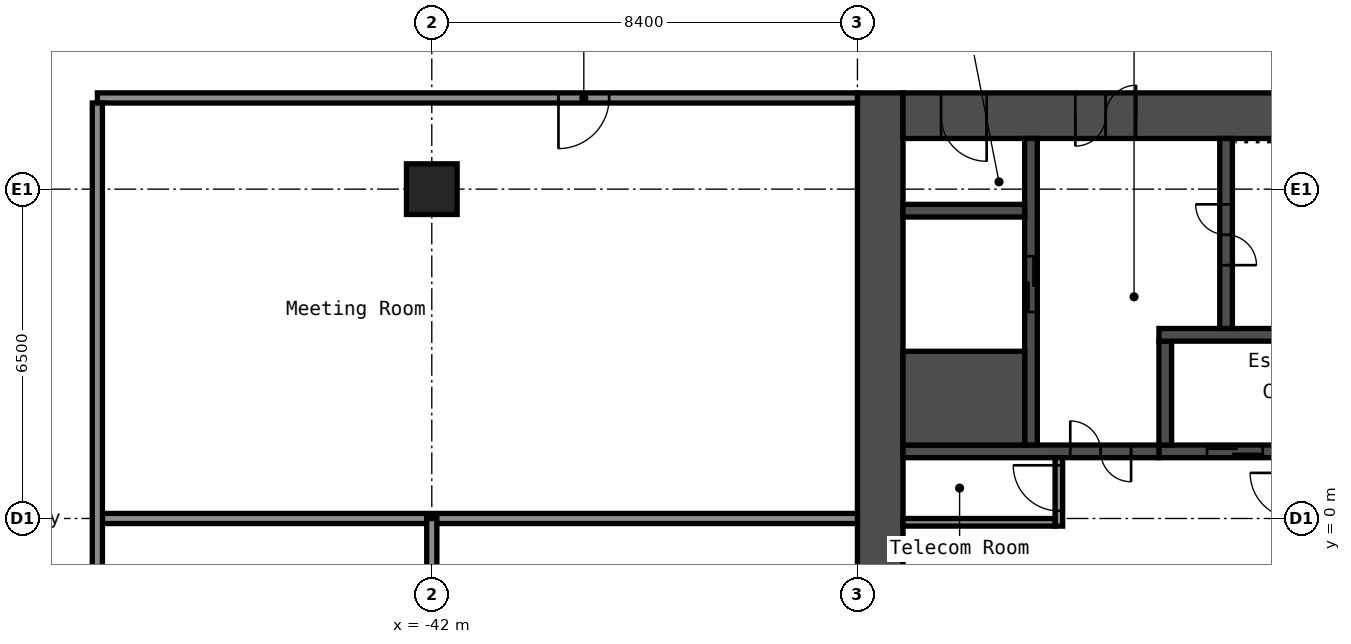
"""IFC4 building model, lengths in metres.
Left out: names, types, materials, properties, quantities, classifications, styles, units other than length and angle.
Written with IfcOpenShell. Run it as: python <this file> out.ifc"""

import sys

from ifc_helpers import new_model, si_unit, direction, frame, frame_2d, origin, origin_2d, place, context, subcontext, project, spatial, rectangle, hollow_rectangle, extrude, element, fill, save


model = new_model("IFC4")
c1 = context("Model", 3, precision=1e-05, world=origin(), true_north=direction((0.0, 1.0)))
c2 = subcontext(c1, "Body", "Model", "MODEL_VIEW")
j1 = project(units=[si_unit("LENGTHUNIT", "METRE"), si_unit("PLANEANGLEUNIT", "RADIAN")], contexts=[c1])
p1 = place(None, origin())
s1 = spatial("IfcSite", under=j1, at=p1, CompositionType="ELEMENT")
p2 = place(p1, origin())
s2 = spatial("IfcBuilding", under=s1, at=p2, CompositionType="ELEMENT")
p3 = place(p2, frame((0.0, 0.0, 39.0)))
s3 = spatial("IfcBuildingStorey", under=s2, at=p3, CompositionType="ELEMENT", Elevation=39.0)
p4 = place(p3, frame((-42.0, 6.5, 0.0), z_axis=(0.0, 0.0, 1.0), x_axis=(1.0, 0.0, 0.0)))
e1 = element("IfcColumn", 1, at=p4, inside=s3, PredefinedType="COLUMN", context=c2, shape_type="SweptSolid", body=[
    extrude(hollow_rectangle(XDim=1.0, YDim=1.0, WallThickness=0.04, at=origin_2d()), origin(), (0.0, 0.0, 1.0), 2.8),
])
p5 = place(p3, frame((-33.15, -8.4, 0.0), z_axis=(0.0, 0.0, 1.0), x_axis=(0.0, 1.0, 0.0)))
e2 = element("IfcWall", 2, at=p5, inside=s3, PredefinedType="SHEAR", context=c2, shape_type="SweptSolid", body=[
    extrude(rectangle(XDim=16.8, YDim=0.9, at=frame_2d((8.4, 0.0))), origin(), (0.0, 0.0, 1.0), 2.8),
])
p6 = place(p3, frame((-32.7, 7.95, 0.0), z_axis=(0.0, 0.0, 1.0), x_axis=(1.0, 0.0, 0.0)))
e3 = element("IfcWall", 3, at=p6, inside=s3, PredefinedType="SHEAR", context=c2, shape_type="SweptSolid", body=[
    extrude(rectangle(XDim=15.0, YDim=0.9, at=frame_2d((7.5, 0.0))), origin(), (0.0, 0.0, 1.0), 2.8),
])
p7 = place(p6, frame((3.4, 0.0, 0.0)))
e4 = element("IfcOpeningElement", 4, at=p7, cuts=e3, PredefinedType="OPENING", context=c2, shape_type="SweptSolid", body=[
    extrude(rectangle(XDim=1.2, YDim=2.1, at=frame_2d((0.6, 1.05))), frame((0.0, 0.46, 0.0), z_axis=(0.0, -1.0, 0.0), x_axis=(1.0, 0.0, 0.0)), (0.0, 0.0, 1.0), 0.92),
])
p8 = place(p6, frame((0.75, 0.0, 0.0)))
e5 = element("IfcOpeningElement", 5, at=p8, cuts=e3, PredefinedType="OPENING", context=c2, shape_type="SweptSolid", body=[
    extrude(rectangle(XDim=0.9, YDim=2.1, at=frame_2d((0.45, 1.05))), frame((0.0, 0.46, 0.0), z_axis=(0.0, -1.0, 0.0), x_axis=(1.0, 0.0, 0.0)), (0.0, 0.0, 1.0), 0.92),
])
p9 = place(p3, frame((-27.65, 1.325, 0.0), z_axis=(0.0, 0.0, 1.0), x_axis=(1.0, 0.0, 0.0)))
e6 = element("IfcWall", 6, at=p9, inside=s3, PredefinedType="SHEAR", context=c2, shape_type="SweptSolid", body=[
    extrude(rectangle(XDim=7.5, YDim=0.25, at=frame_2d((3.75, 0.0))), origin(), (0.0, 0.0, 1.0), 2.8),
])
p10 = place(p9, frame((5.75, 0.0, 0.0)))
e7 = element("IfcOpeningElement", 7, at=p10, cuts=e6, PredefinedType="OPENING", context=c2, shape_type="SweptSolid", body=[
    extrude(rectangle(XDim=1.1, YDim=2.1, at=frame_2d((0.55, 1.05))), frame((0.0, 0.135, 0.0), z_axis=(0.0, -1.0, 0.0), x_axis=(1.0, 0.0, 0.0)), (0.0, 0.0, 1.0), 0.27),
])
p11 = place(p9, frame((3.35, 0.0, 0.0)))
e8 = element("IfcOpeningElement", 8, at=p11, cuts=e6, PredefinedType="OPENING", context=c2, shape_type="SweptSolid", body=[
    extrude(rectangle(XDim=1.1, YDim=2.1, at=frame_2d((0.55, 1.05))), frame((0.0, 0.135, 0.0), z_axis=(0.0, -1.0, 0.0), x_axis=(1.0, 0.0, 0.0)), (0.0, 0.0, 1.0), 0.27),
])
p12 = place(p9, frame((0.95, 0.0, 0.0)))
e9 = element("IfcOpeningElement", 9, at=p12, cuts=e6, PredefinedType="OPENING", context=c2, shape_type="SweptSolid", body=[
    extrude(rectangle(XDim=1.1, YDim=2.1, at=frame_2d((0.55, 1.05))), frame((0.0, 0.135, 0.0), z_axis=(0.0, -1.0, 0.0), x_axis=(1.0, 0.0, 0.0)), (0.0, 0.0, 1.0), 0.27),
])
p13 = place(p3, frame((-27.525, 1.45, 0.0), z_axis=(0.0, 0.0, 1.0), x_axis=(0.0, 1.0, 0.0)))
e10 = element("IfcWall", 10, at=p13, inside=s3, PredefinedType="SHEAR", context=c2, shape_type="SweptSolid", body=[
    extrude(rectangle(XDim=2.05, YDim=0.25, at=frame_2d((1.025, 0.0))), origin(), (0.0, 0.0, 1.0), 2.8),
])
p14 = place(p3, frame((-27.65, 3.625, 0.0), z_axis=(0.0, 0.0, 1.0), x_axis=(1.0, 0.0, 0.0)))
e11 = element("IfcWall", 11, at=p14, inside=s3, PredefinedType="SHEAR", context=c2, shape_type="SweptSolid", body=[
    extrude(rectangle(XDim=7.5, YDim=0.25, at=frame_2d((3.75, 0.0))), origin(), (0.0, 0.0, 1.0), 2.8),
])
p15 = place(p3, frame((-26.325, 3.75, 0.0), z_axis=(0.0, 0.0, 1.0), x_axis=(0.0, 1.0, 0.0)))
e12 = element("IfcWall", 12, at=p15, inside=s3, PredefinedType="SHEAR", context=c2, shape_type="SweptSolid", body=[
    extrude(rectangle(XDim=3.75, YDim=0.25, at=frame_2d((1.875, 0.0))), origin(), (0.0, 0.0, 1.0), 2.8),
])
p16 = place(p15, frame((1.25, 0.0, 0.0)))
e13 = element("IfcOpeningElement", 13, at=p16, cuts=e12, PredefinedType="OPENING", context=c2, shape_type="SweptSolid", body=[
    extrude(rectangle(XDim=1.2, YDim=2.1, at=frame_2d((0.6, 1.05))), frame((0.0, 0.135, 0.0), z_axis=(0.0, -1.0, 0.0), x_axis=(1.0, 0.0, 0.0)), (0.0, 0.0, 1.0), 0.27),
])
p17 = place(p3, frame((-32.7, 1.325, 0.0), z_axis=(0.0, 0.0, 1.0), x_axis=(1.0, 0.0, 0.0)))
e14 = element("IfcWall", 14, at=p17, inside=s3, PredefinedType="SHEAR", context=c2, shape_type="SweptSolid", body=[
    extrude(rectangle(XDim=5.05, YDim=0.25, at=frame_2d((2.525, 0.0))), origin(), (0.0, 0.0, 1.0), 2.8),
])
p18 = place(p17, frame((3.3, 0.0, 0.0)))
e15 = element("IfcOpeningElement", 15, at=p18, cuts=e14, PredefinedType="OPENING", context=c2, shape_type="SweptSolid", body=[
    extrude(rectangle(XDim=1.2, YDim=2.1, at=frame_2d((0.6, 1.05))), frame((0.0, 0.135, 0.0), z_axis=(0.0, -1.0, 0.0), x_axis=(1.0, 0.0, 0.0)), (0.0, 0.0, 1.0), 0.27),
])
p19 = place(p3, frame((-30.175, 1.45, 0.0), z_axis=(0.0, 0.0, 1.0), x_axis=(0.0, 1.0, 0.0)))
e16 = element("IfcWall", 16, at=p19, inside=s3, PredefinedType="SHEAR", context=c2, shape_type="SweptSolid", body=[
    extrude(rectangle(XDim=6.05, YDim=0.25, at=frame_2d((3.025, 0.0))), origin(), (0.0, 0.0, 1.0), 2.8),
])
p20 = place(p19, frame((2.625, 0.0, 0.0)))
e17 = element("IfcOpeningElement", 17, at=p20, cuts=e16, PredefinedType="OPENING", context=c2, shape_type="SweptSolid", body=[
    extrude(rectangle(XDim=1.1, YDim=2.1, at=frame_2d((0.55, 1.05))), frame((0.0, 0.135, 0.0), z_axis=(0.0, -1.0, 0.0), x_axis=(1.0, 0.0, 0.0)), (0.0, 0.0, 1.0), 0.27),
])
p21 = place(p3, frame((-32.7, 2.375, 0.0), z_axis=(0.0, 0.0, 1.0), x_axis=(1.0, 0.0, 0.0)))
e18 = element("IfcWall", 18, at=p21, inside=s3, PredefinedType="SHEAR", context=c2, shape_type="SweptSolid", body=[
    extrude(rectangle(XDim=2.4, YDim=1.85, at=frame_2d((1.2, 0.0))), origin(), (0.0, 0.0, 1.0), 2.8),
])
p22 = place(p3, frame((-32.7, 6.075, 0.0), z_axis=(0.0, 0.0, 1.0), x_axis=(1.0, 0.0, 0.0)))
e19 = element("IfcWall", 19, at=p22, inside=s3, PredefinedType="SHEAR", context=c2, shape_type="SweptSolid", body=[
    extrude(rectangle(XDim=2.4, YDim=0.25, at=frame_2d((1.2, 0.0))), origin(), (0.0, 0.0, 1.0), 2.8),
])
p23 = place(p3, frame((-29.625, -0.15, 0.0), z_axis=(0.0, 0.0, 1.0), x_axis=(0.0, 1.0, 0.0)))
e20 = element("IfcWall", 20, at=p23, inside=s3, PredefinedType="PARTITIONING", context=c2, shape_type="SweptSolid", body=[
    extrude(rectangle(XDim=1.35, YDim=0.15, at=frame_2d((0.675, 0.0))), origin(), (0.0, 0.0, 1.0), 2.8),
])
p24 = place(p23, frame((0.3, 0.0, 0.0)))
e21 = element("IfcOpeningElement", 21, at=p24, cuts=e20, PredefinedType="OPENING", context=c2, shape_type="SweptSolid", body=[
    extrude(rectangle(XDim=0.9, YDim=2.1, at=frame_2d((0.45, 1.05))), frame((0.0, 0.085, 0.0), z_axis=(0.0, -1.0, 0.0), x_axis=(1.0, 0.0, 0.0)), (0.0, 0.0, 1.0), 0.17),
])
p25 = place(p3, frame((-32.7, -0.075, 0.0), z_axis=(0.0, 0.0, 1.0), x_axis=(1.0, 0.0, 0.0)))
e22 = element("IfcWall", 22, at=p25, inside=s3, PredefinedType="PARTITIONING", context=c2, shape_type="SweptSolid", body=[
    extrude(rectangle(XDim=3.0, YDim=0.15, at=frame_2d((1.5, 0.0))), origin(), (0.0, 0.0, 1.0), 2.8),
])
p26 = place(p3, frame((-48.5, 0.0, 0.0), z_axis=(0.0, 0.0, 1.0), x_axis=(1.0, 0.0, 0.0)))
e23 = element("IfcWall", 23, at=p26, inside=s3, PredefinedType="PARTITIONING", context=c2, shape_type="SweptSolid", body=[
    extrude(rectangle(XDim=14.9, YDim=0.2, at=frame_2d((7.45, 0.0))), origin(), (0.0, 0.0, 1.0), 2.8),
])
p27 = place(p3, frame((-48.6, 8.3, 0.0), z_axis=(0.0, 0.0, 1.0), x_axis=(1.0, 0.0, 0.0)))
e24 = element("IfcWall", 24, at=p27, inside=s3, PredefinedType="PARTITIONING", context=c2, shape_type="SweptSolid", body=[
    extrude(rectangle(XDim=15.0, YDim=0.2, at=frame_2d((7.5, 0.0))), origin(), (0.0, 0.0, 1.0), 2.8),
])
p28 = place(p27, frame((9.1, 0.0, 0.0)))
e25 = element("IfcOpeningElement", 25, at=p28, cuts=e24, PredefinedType="OPENING", context=c2, shape_type="SweptSolid", body=[
    extrude(rectangle(XDim=1.0, YDim=2.1, at=frame_2d((0.5, 1.05))), frame((0.0, 0.11, 0.0), z_axis=(0.0, -1.0, 0.0), x_axis=(1.0, 0.0, 0.0)), (0.0, 0.0, 1.0), 0.22),
])
p29 = place(p3, frame((-48.6, -8.2, 0.0), z_axis=(0.0, 0.0, 1.0), x_axis=(0.0, 1.0, 0.0)))
e26 = element("IfcWall", 26, at=p29, inside=s3, PredefinedType="PARTITIONING", context=c2, shape_type="SweptSolid", body=[
    extrude(rectangle(XDim=16.4, YDim=0.2, at=frame_2d((8.2, 0.0))), origin(), (0.0, 0.0, 1.0), 2.8),
])
p30 = place(p3, frame((-42.0, -8.2, 0.0), z_axis=(0.0, 0.0, 1.0), x_axis=(0.0, 1.0, 0.0)))
e27 = element("IfcWall", 27, at=p30, inside=s3, PredefinedType="PARTITIONING", context=c2, shape_type="SweptSolid", body=[
    extrude(rectangle(XDim=8.2, YDim=0.2, at=frame_2d((4.1, 0.0))), origin(), (0.0, 0.0, 1.0), 2.8),
])
p31 = place(p7, origin())
e28 = element("IfcDoor", 28, at=p31, inside=s3, OperationType="DOUBLE_DOOR_SINGLE_SWING", PredefinedType="DOOR", context=c2, shape_type="SweptSolid", body=[
    extrude(rectangle(XDim=1.2, YDim=2.1, at=frame_2d((0.6, 1.05))), frame((0.0, 0.025, 0.0), z_axis=(0.0, -1.0, 0.0), x_axis=(1.0, 0.0, 0.0)), (0.0, 0.0, 1.0), 0.05),
])
fill(e4, e28)
p32 = place(p8, origin())
e29 = element("IfcDoor", 29, at=p32, inside=s3, OperationType="SINGLE_SWING_RIGHT", PredefinedType="DOOR", context=c2, shape_type="SweptSolid", body=[
    extrude(rectangle(XDim=0.9, YDim=2.1, at=frame_2d((0.45, 1.05))), frame((0.0, 0.025, 0.0), z_axis=(0.0, -1.0, 0.0), x_axis=(1.0, 0.0, 0.0)), (0.0, 0.0, 1.0), 0.05),
])
fill(e5, e29)
p33 = place(p16, origin())
e30 = element("IfcDoor", 30, at=p33, inside=s3, OperationType="DOUBLE_DOOR_SINGLE_SWING", PredefinedType="DOOR", context=c2, shape_type="SweptSolid", body=[
    extrude(rectangle(XDim=1.2, YDim=2.1, at=frame_2d((0.6, 1.05))), frame((0.0, 0.025, 0.0), z_axis=(0.0, -1.0, 0.0), x_axis=(1.0, 0.0, 0.0)), (0.0, 0.0, 1.0), 0.05),
])
fill(e13, e30)
p34 = place(p18, origin())
e31 = element("IfcDoor", 31, at=p34, inside=s3, OperationType="DOUBLE_DOOR_SINGLE_SWING", PredefinedType="DOOR", context=c2, shape_type="SweptSolid", body=[
    extrude(rectangle(XDim=1.2, YDim=2.1, at=frame_2d((0.6, 1.05))), frame((0.0, 0.025, 0.0), z_axis=(0.0, -1.0, 0.0), x_axis=(1.0, 0.0, 0.0)), (0.0, 0.0, 1.0), 0.05),
])
fill(e15, e31)
p35 = place(p24, origin())
e32 = element("IfcDoor", 32, at=p35, inside=s3, OperationType="SINGLE_SWING_LEFT", PredefinedType="DOOR", context=c2, shape_type="SweptSolid", body=[
    extrude(rectangle(XDim=0.9, YDim=2.1, at=frame_2d((0.45, 1.05))), frame((0.0, 0.025, 0.0), z_axis=(0.0, -1.0, 0.0), x_axis=(1.0, 0.0, 0.0)), (0.0, 0.0, 1.0), 0.05),
])
fill(e21, e32)
p36 = place(p12, origin())
e33 = element("IfcDoor", 33, at=p36, inside=s3, OperationType="DOUBLE_DOOR_SLIDING", PredefinedType="DOOR", context=c2, shape_type="SweptSolid", body=[
    extrude(rectangle(XDim=1.1, YDim=2.1, at=frame_2d((0.55, 1.05))), frame((0.0, 0.025, 0.0), z_axis=(0.0, -1.0, 0.0), x_axis=(1.0, 0.0, 0.0)), (0.0, 0.0, 1.0), 0.05),
])
fill(e9, e33)
p37 = place(p20, origin())
e34 = element("IfcDoor", 34, at=p37, inside=s3, OperationType="DOUBLE_DOOR_SLIDING", PredefinedType="DOOR", context=c2, shape_type="SweptSolid", body=[
    extrude(rectangle(XDim=1.1, YDim=2.1, at=frame_2d((0.55, 1.05))), frame((0.0, 0.025, 0.0), z_axis=(0.0, -1.0, 0.0), x_axis=(1.0, 0.0, 0.0)), (0.0, 0.0, 1.0), 0.05),
])
fill(e17, e34)
p38 = place(p28, origin())
e35 = element("IfcDoor", 35, at=p38, inside=s3, OperationType="SINGLE_SWING_LEFT", PredefinedType="DOOR", context=c2, shape_type="SweptSolid", body=[
    extrude(rectangle(XDim=1.0, YDim=2.1, at=frame_2d((0.5, 1.05))), frame((0.0, 0.025, 0.0), z_axis=(0.0, -1.0, 0.0), x_axis=(1.0, 0.0, 0.0)), (0.0, 0.0, 1.0), 0.05),
])
fill(e25, e35)
save(model, sys.argv[1])
